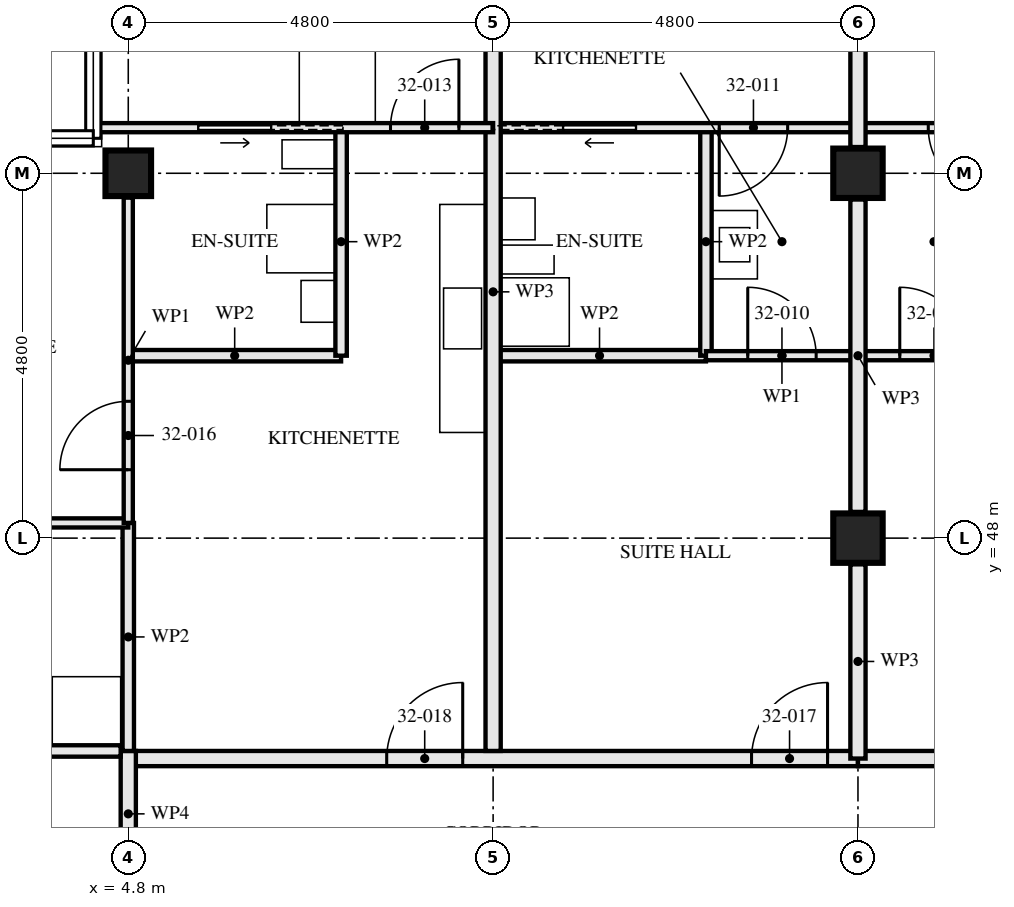
"""IFC4 building model, lengths in metres.
Left out: names, types, materials, properties, quantities, classifications, styles, units other than length and angle.
Written with IfcOpenShell. Run it as: python <this file> out.ifc"""

import sys

from ifc_helpers import new_model, si_unit, direction, frame, frame_2d, origin, origin_2d, place, context, subcontext, project, spatial, rectangle, hollow_rectangle, extrude, element, fill, save


model = new_model("IFC4")
c1 = context("Model", 3, precision=1e-05, world=origin(), true_north=direction((0.0, 1.0)))
c2 = subcontext(c1, "Body", "Model", "MODEL_VIEW")
j1 = project(units=[si_unit("LENGTHUNIT", "METRE"), si_unit("PLANEANGLEUNIT", "RADIAN")], contexts=[c1])
p1 = place(None, origin())
s1 = spatial("IfcSite", under=j1, at=p1, CompositionType="ELEMENT")
p2 = place(p1, origin())
s2 = spatial("IfcBuilding", under=s1, at=p2, CompositionType="ELEMENT")
p3 = place(p2, frame((0.0, 0.0, 119.0)))
s3 = spatial("IfcBuildingStorey", under=s2, at=p3, CompositionType="ELEMENT", Elevation=119.0)
p4 = place(p3, frame((4.8, 52.8, 0.0), z_axis=(0.0, 0.0, 1.0), x_axis=(0.0, 1.0, 0.0)))
e1 = element("IfcColumn", 1, at=p4, inside=s3, PredefinedType="COLUMN", context=c2, shape_type="SweptSolid", body=[
    extrude(hollow_rectangle(XDim=0.6, YDim=0.6, WallThickness=0.08, at=origin_2d()), origin(), (0.0, 0.0, 1.0), 3.5),
])
for number, where, z_axis, x_axis in (
    (2, (14.4, 48.0, 0.0), (0.0, 0.0, 1.0), (1.0, 0.0, 0.0)),
    (3, (14.4, 52.8, 0.0), (0.0, 0.0, 1.0), (1.0, 0.0, 0.0)),
):
    element("IfcColumn", number, at=place(p3, frame(where, z_axis=z_axis, x_axis=x_axis)), inside=s3, PredefinedType="COLUMN", context=c2, shape_type="SweptSolid", body=[
        extrude(hollow_rectangle(XDim=0.65, YDim=0.65, WallThickness=0.05, at=origin_2d()), origin(), (0.0, 0.0, 1.0), 3.5),
    ])
p5 = place(p3, frame((12.4, 53.4, 0.0), z_axis=(0.0, 0.0, 1.0), x_axis=(0.0, -1.0, 0.0)))
e4 = element("IfcWall", 4, at=p5, inside=s3, PredefinedType="PARTITIONING", context=c2, shape_type="SweptSolid", body=[
    extrude(rectangle(XDim=3.0, YDim=0.15, at=frame_2d((1.5, 0.0))), origin(), (0.0, 0.0, 1.0), 2.55),
])
p6 = place(p3, frame((12.4, 50.4, 0.0), z_axis=(0.0, 0.0, 1.0), x_axis=(-1.0, 0.0, 0.0)))
e5 = element("IfcWall", 5, at=p6, inside=s3, PredefinedType="PARTITIONING", context=c2, shape_type="SweptSolid", body=[
    extrude(rectangle(XDim=2.8, YDim=0.15, at=frame_2d((1.4, 0.0))), origin(), (0.0, 0.0, 1.0), 3.33),
])
p7 = place(p3, frame((14.4, 50.4, 0.0), z_axis=(0.0, 0.0, 1.0), x_axis=(-1.0, 0.0, 0.0)))
e6 = element("IfcWall", 6, at=p7, inside=s3, PredefinedType="PARTITIONING", context=c2, shape_type="SweptSolid", body=[
    extrude(rectangle(XDim=2.0, YDim=0.12, at=frame_2d((1.0, 0.0))), origin(), (0.0, 0.0, 1.0), 3.33),
])
p8 = place(p7, frame((0.55, 0.0, 0.0)))
e7 = element("IfcOpeningElement", 7, at=p8, cuts=e6, PredefinedType="OPENING", context=c2, shape_type="SweptSolid", body=[
    extrude(rectangle(XDim=0.9, YDim=2.1, at=frame_2d((0.45, 1.05))), frame((0.0, 0.071, 0.0), z_axis=(0.0, -1.0, 0.0), x_axis=(1.0, 0.0, 0.0)), (0.0, 0.0, 1.0), 0.141),
])
p9 = place(p3, frame((14.4, 53.4, 0.0), z_axis=(0.0, 0.0, 1.0), x_axis=(-1.0, 0.0, 0.0)))
e8 = element("IfcWall", 8, at=p9, inside=s3, PredefinedType="PARTITIONING", context=c2, shape_type="SweptSolid", body=[
    extrude(rectangle(XDim=4.8, YDim=0.12, at=frame_2d((2.4, 0.0))), origin(), (0.0, 0.0, 1.0), 3.33),
])
p10 = place(p9, frame((0.925, 0.0, 0.0)))
e9 = element("IfcOpeningElement", 9, at=p10, cuts=e8, PredefinedType="OPENING", context=c2, shape_type="SweptSolid", body=[
    extrude(rectangle(XDim=0.9, YDim=2.1, at=frame_2d((0.45, 1.05))), frame((0.0, 0.071, 0.0), z_axis=(0.0, -1.0, 0.0), x_axis=(1.0, 0.0, 0.0)), (0.0, 0.0, 1.0), 0.141),
])
p11 = place(p9, frame((2.925, 0.0, 0.0)))
e10 = element("IfcOpeningElement", 10, at=p11, cuts=e8, PredefinedType="OPENING", context=c2, shape_type="SweptSolid", body=[
    extrude(rectangle(XDim=0.95, YDim=2.1, at=frame_2d((0.475, 1.05))), frame((0.0, 0.071, 0.0), z_axis=(0.0, -1.0, 0.0), x_axis=(1.0, 0.0, 0.0)), (0.0, 0.0, 1.0), 0.141),
])
p12 = place(p3, frame((9.6, 57.28, 0.0), z_axis=(0.0, 0.0, 1.0), x_axis=(0.0, -1.0, 0.0)))
e11 = element("IfcWall", 11, at=p12, inside=s3, PredefinedType="PARTITIONING", context=c2, shape_type="SweptSolid", body=[
    extrude(rectangle(XDim=12.08, YDim=0.2, at=frame_2d((6.04, 0.0))), origin(), (0.0, 0.0, 1.0), 2.55),
])
p13 = place(p3, frame((7.6, 53.4, 0.0), z_axis=(0.0, 0.0, 1.0), x_axis=(0.0, -1.0, 0.0)))
e12 = element("IfcWall", 12, at=p13, inside=s3, PredefinedType="PARTITIONING", context=c2, shape_type="SweptSolid", body=[
    extrude(rectangle(XDim=3.0, YDim=0.15, at=frame_2d((1.5, 0.0))), origin(), (0.0, 0.0, 1.0), 2.55),
])
p14 = place(p3, frame((7.6, 50.4, 0.0), z_axis=(0.0, 0.0, 1.0), x_axis=(-1.0, 0.0, 0.0)))
e13 = element("IfcWall", 13, at=p14, inside=s3, PredefinedType="PARTITIONING", context=c2, shape_type="SweptSolid", body=[
    extrude(rectangle(XDim=2.8, YDim=0.15, at=frame_2d((1.4, 0.0))), origin(), (0.0, 0.0, 1.0), 3.33),
])
p15 = place(p3, frame((4.8, 48.2, 0.0), z_axis=(0.0, 0.0, 1.0), x_axis=(0.0, -1.0, 0.0)))
e14 = element("IfcWall", 14, at=p15, inside=s3, PredefinedType="PARTITIONING", context=c2, shape_type="SweptSolid", body=[
    extrude(rectangle(XDim=3.0, YDim=0.15, at=frame_2d((1.5, 0.0))), origin(), (0.0, 0.0, 1.0), 2.55),
])
p16 = place(p3, frame((9.6, 53.4, 0.0), z_axis=(0.0, 0.0, 1.0), x_axis=(-1.0, 0.0, 0.0)))
e15 = element("IfcWall", 15, at=p16, inside=s3, PredefinedType="PARTITIONING", context=c2, shape_type="SweptSolid", body=[
    extrude(rectangle(XDim=5.24, YDim=0.12, at=frame_2d((2.62, 0.0))), origin(), (0.0, 0.0, 1.0), 2.32),
])
p17 = place(p16, frame((0.45, 0.0, 0.0)))
e16 = element("IfcOpeningElement", 16, at=p17, cuts=e15, PredefinedType="OPENING", context=c2, shape_type="SweptSolid", body=[
    extrude(rectangle(XDim=0.9, YDim=2.1, at=frame_2d((0.45, 1.05))), frame((0.0, 0.071, 0.0), z_axis=(0.0, -1.0, 0.0), x_axis=(1.0, 0.0, 0.0)), (0.0, 0.0, 1.0), 0.141),
])
p18 = place(p16, frame((2.925, 0.0, 0.0)))
e17 = element("IfcOpeningElement", 17, at=p18, cuts=e15, PredefinedType="OPENING", context=c2, shape_type="SweptSolid", body=[
    extrude(rectangle(XDim=0.95, YDim=2.1, at=frame_2d((0.475, 1.05))), frame((0.0, 0.071, 0.0), z_axis=(0.0, -1.0, 0.0), x_axis=(1.0, 0.0, 0.0)), (0.0, 0.0, 1.0), 0.141),
])
p19 = place(p3, frame((4.8, 48.2, 0.0), z_axis=(0.0, 0.0, 1.0), x_axis=(-1.0, 0.0, 0.0)))
e18 = element("IfcWall", 18, at=p19, inside=s3, PredefinedType="PARTITIONING", context=c2, shape_type="SweptSolid", body=[
    extrude(rectangle(XDim=4.48, YDim=0.12, at=frame_2d((2.24, 0.0))), origin(), (0.0, 0.0, 1.0), 3.33),
])
p20 = place(p19, frame((1.925, 0.0, 0.0)))
e19 = element("IfcOpeningElement", 19, at=p20, cuts=e18, PredefinedType="OPENING", context=c2, shape_type="SweptSolid", body=[
    extrude(rectangle(XDim=0.95, YDim=2.1, at=frame_2d((0.475, 1.05))), frame((0.0, 0.071, 0.0), z_axis=(0.0, -1.0, 0.0), x_axis=(1.0, 0.0, 0.0)), (0.0, 0.0, 1.0), 0.141),
])
p21 = place(p3, frame((4.8, 52.48, 0.0), z_axis=(0.0, 0.0, 1.0), x_axis=(0.0, -1.0, 0.0)))
e20 = element("IfcWall", 20, at=p21, inside=s3, PredefinedType="PARTITIONING", context=c2, shape_type="SweptSolid", body=[
    extrude(rectangle(XDim=4.28, YDim=0.12, at=frame_2d((2.14, 0.0))), origin(), (0.0, 0.0, 1.0), 3.33),
])
p22 = place(p21, frame((2.68, 0.0, 0.0)))
e21 = element("IfcOpeningElement", 21, at=p22, cuts=e20, PredefinedType="OPENING", context=c2, shape_type="SweptSolid", body=[
    extrude(rectangle(XDim=0.9, YDim=2.1, at=frame_2d((0.45, 1.05))), frame((0.0, 0.071, 0.0), z_axis=(0.0, -1.0, 0.0), x_axis=(1.0, 0.0, 0.0)), (0.0, 0.0, 1.0), 0.141),
])
p23 = place(p3, frame((14.4, 45.1, 0.0), z_axis=(0.0, 0.0, 1.0), x_axis=(-1.0, 0.0, 0.0)))
e22 = element("IfcWall", 22, at=p23, inside=s3, PredefinedType="PARTITIONING", context=c2, shape_type="SweptSolid", body=[
    extrude(rectangle(XDim=9.6, YDim=0.2, at=frame_2d((4.8, 0.0))), origin(), (0.0, 0.0, 1.0), 3.33),
])
p24 = place(p23, frame((0.4, 0.0, 0.0)))
e23 = element("IfcOpeningElement", 23, at=p24, cuts=e22, PredefinedType="OPENING", context=c2, shape_type="SweptSolid", body=[
    extrude(rectangle(XDim=1.0, YDim=2.1, at=frame_2d((0.5, 1.05))), frame((0.0, 0.111, 0.0), z_axis=(0.0, -1.0, 0.0), x_axis=(1.0, 0.0, 0.0)), (0.0, 0.0, 1.0), 0.221),
])
p25 = place(p23, frame((5.2, 0.0, 0.0)))
e24 = element("IfcOpeningElement", 24, at=p25, cuts=e22, PredefinedType="OPENING", context=c2, shape_type="SweptSolid", body=[
    extrude(rectangle(XDim=1.0, YDim=2.1, at=frame_2d((0.5, 1.05))), frame((0.0, 0.111, 0.0), z_axis=(0.0, -1.0, 0.0), x_axis=(1.0, 0.0, 0.0)), (0.0, 0.0, 1.0), 0.221),
])
p26 = place(p3, frame((4.8, 45.2, 0.0), z_axis=(0.0, 0.0, 1.0), x_axis=(0.0, -1.0, 0.0)))
e25 = element("IfcWall", 25, at=p26, inside=s3, PredefinedType="PARTITIONING", context=c2, shape_type="SweptSolid", body=[
    extrude(rectangle(XDim=1.655, YDim=0.2, at=frame_2d((0.828, 0.0))), origin(), (0.0, 0.0, 1.0), 3.33),
])
p27 = place(p3, frame((16.4, 50.4, 0.0), z_axis=(0.0, 0.0, 1.0), x_axis=(-1.0, 0.0, 0.0)))
e26 = element("IfcWall", 26, at=p27, inside=s3, PredefinedType="PARTITIONING", context=c2, shape_type="SweptSolid", body=[
    extrude(rectangle(XDim=2.0, YDim=0.12, at=frame_2d((1.0, 0.0))), origin(), (0.0, 0.0, 1.0), 3.33),
])
p28 = place(p27, frame((0.55, 0.0, 0.0)))
e27 = element("IfcOpeningElement", 27, at=p28, cuts=e26, PredefinedType="OPENING", context=c2, shape_type="SweptSolid", body=[
    extrude(rectangle(XDim=0.9, YDim=2.1, at=frame_2d((0.45, 1.05))), frame((0.0, 0.071, 0.0), z_axis=(0.0, -1.0, 0.0), x_axis=(1.0, 0.0, 0.0)), (0.0, 0.0, 1.0), 0.141),
])
p29 = place(p3, frame((19.2, 53.4, 0.0), z_axis=(0.0, 0.0, 1.0), x_axis=(-1.0, 0.0, 0.0)))
e28 = element("IfcWall", 28, at=p29, inside=s3, PredefinedType="PARTITIONING", context=c2, shape_type="SweptSolid", body=[
    extrude(rectangle(XDim=4.8, YDim=0.12, at=frame_2d((2.4, 0.0))), origin(), (0.0, 0.0, 1.0), 3.33),
])
p30 = place(p29, frame((2.975, 0.0, 0.0)))
e29 = element("IfcOpeningElement", 29, at=p30, cuts=e28, PredefinedType="OPENING", context=c2, shape_type="SweptSolid", body=[
    extrude(rectangle(XDim=0.9, YDim=2.1, at=frame_2d((0.45, 1.05))), frame((0.0, 0.071, 0.0), z_axis=(0.0, -1.0, 0.0), x_axis=(1.0, 0.0, 0.0)), (0.0, 0.0, 1.0), 0.141),
])
p31 = place(p29, frame((0.925, 0.0, 0.0)))
e30 = element("IfcOpeningElement", 30, at=p31, cuts=e28, PredefinedType="OPENING", context=c2, shape_type="SweptSolid", body=[
    extrude(rectangle(XDim=0.95, YDim=2.1, at=frame_2d((0.475, 1.05))), frame((0.0, 0.071, 0.0), z_axis=(0.0, -1.0, 0.0), x_axis=(1.0, 0.0, 0.0)), (0.0, 0.0, 1.0), 0.141),
])
p32 = place(p3, frame((29.24, 45.1, 0.0), z_axis=(0.0, 0.0, 1.0), x_axis=(-1.0, 0.0, 0.0)))
e31 = element("IfcWall", 31, at=p32, inside=s3, PredefinedType="PARTITIONING", context=c2, shape_type="SweptSolid", body=[
    extrude(rectangle(XDim=14.84, YDim=0.2, at=frame_2d((7.42, 0.0))), origin(), (0.0, 0.0, 1.0), 2.32),
])
p33 = place(p32, frame((0.84, 0.0, 0.0)))
e32 = element("IfcOpeningElement", 32, at=p33, cuts=e31, PredefinedType="OPENING", context=c2, shape_type="SweptSolid", body=[
    extrude(rectangle(XDim=1.0, YDim=2.1, at=frame_2d((0.5, 1.05))), frame((0.0, 0.111, 0.0), z_axis=(0.0, -1.0, 0.0), x_axis=(1.0, 0.0, 0.0)), (0.0, 0.0, 1.0), 0.221),
])
p34 = place(p32, frame((5.64, 0.0, 0.0)))
e33 = element("IfcOpeningElement", 33, at=p34, cuts=e31, PredefinedType="OPENING", context=c2, shape_type="SweptSolid", body=[
    extrude(rectangle(XDim=1.0, YDim=2.1, at=frame_2d((0.5, 1.05))), frame((0.0, 0.111, 0.0), z_axis=(0.0, -1.0, 0.0), x_axis=(1.0, 0.0, 0.0)), (0.0, 0.0, 1.0), 0.221),
])
p35 = place(p32, frame((10.44, 0.0, 0.0)))
e34 = element("IfcOpeningElement", 34, at=p35, cuts=e31, PredefinedType="OPENING", context=c2, shape_type="SweptSolid", body=[
    extrude(rectangle(XDim=1.0, YDim=2.1, at=frame_2d((0.5, 1.05))), frame((0.0, 0.111, 0.0), z_axis=(0.0, -1.0, 0.0), x_axis=(1.0, 0.0, 0.0)), (0.0, 0.0, 1.0), 0.221),
])
p36 = place(p3, frame((14.4, 45.1, 0.0), z_axis=(0.0, 0.0, 1.0), x_axis=(0.0, 1.0, 0.0)))
e35 = element("IfcWall", 35, at=p36, inside=s3, PredefinedType="PARTITIONING", context=c2, shape_type="SweptSolid", body=[
    extrude(rectangle(XDim=2.555, YDim=0.2, at=frame_2d((1.277, 0.0))), origin(), (0.0, 0.0, 1.0), 2.32),
])
p37 = place(p3, frame((14.4, 48.345, 0.0), z_axis=(0.0, 0.0, 1.0), x_axis=(0.0, 1.0, 0.0)))
e36 = element("IfcWall", 36, at=p37, inside=s3, PredefinedType="PARTITIONING", context=c2, shape_type="SweptSolid", body=[
    extrude(rectangle(XDim=4.11, YDim=0.2, at=frame_2d((2.055, 0.0))), origin(), (0.0, 0.0, 1.0), 2.32),
])
p38 = place(p3, frame((14.4, 53.145, 0.0), z_axis=(0.0, 0.0, 1.0), x_axis=(0.0, 1.0, 0.0)))
e37 = element("IfcWall", 37, at=p38, inside=s3, PredefinedType="PARTITIONING", context=c2, shape_type="SweptSolid", body=[
    extrude(rectangle(XDim=4.135, YDim=0.2, at=frame_2d((2.067, 0.0))), origin(), (0.0, 0.0, 1.0), 2.32),
])
p39 = place(p3, frame((4.7, 45.2, 0.0), z_axis=(0.0, 0.0, 1.0), x_axis=(-1.0, 0.0, 0.0)))
e38 = element("IfcWall", 38, at=p39, inside=s3, PredefinedType="PARTITIONING", context=c2, shape_type="SweptSolid", body=[
    extrude(rectangle(XDim=5.14, YDim=0.15, at=frame_2d((2.57, 0.0))), origin(), (0.0, 0.0, 1.0), 2.32),
])
p40 = place(p8, frame((0.9, 0.0, 0.0), z_axis=(0.0, 0.0, 1.0), x_axis=(-1.0, 0.0, 0.0)))
e39 = element("IfcDoor", 39, at=p40, inside=s3, OperationType="SINGLE_SWING_RIGHT", PredefinedType="DOOR", context=c2, shape_type="SweptSolid", body=[
    extrude(rectangle(XDim=0.9, YDim=2.1, at=frame_2d((0.45, 1.05))), frame((0.0, 0.022, 0.0), z_axis=(0.0, -1.0, 0.0), x_axis=(1.0, 0.0, 0.0)), (0.0, 0.0, 1.0), 0.044),
])
fill(e7, e39)
p41 = place(p10, origin())
e40 = element("IfcDoor", 40, at=p41, inside=s3, OperationType="SINGLE_SWING_LEFT", PredefinedType="DOOR", context=c2, shape_type="SweptSolid", body=[
    extrude(rectangle(XDim=0.9, YDim=2.1, at=frame_2d((0.45, 1.05))), frame((0.0, 0.022, 0.0), z_axis=(0.0, -1.0, 0.0), x_axis=(1.0, 0.0, 0.0)), (0.0, 0.0, 1.0), 0.044),
])
fill(e9, e40)
p42 = place(p11, origin())
e41 = element("IfcDoor", 41, at=p42, inside=s3, OperationType="SLIDING_TO_LEFT", PredefinedType="DOOR", context=c2, shape_type="SweptSolid", body=[
    extrude(rectangle(XDim=0.95, YDim=2.1, at=frame_2d((0.475, 1.05))), frame((0.0, 0.022, 0.0), z_axis=(0.0, -1.0, 0.0), x_axis=(1.0, 0.0, 0.0)), (0.0, 0.0, 1.0), 0.044),
])
fill(e10, e41)
p43 = place(p17, frame((0.9, 0.0, 0.0), z_axis=(0.0, 0.0, 1.0), x_axis=(-1.0, 0.0, 0.0)))
e42 = element("IfcDoor", 42, at=p43, inside=s3, OperationType="SINGLE_SWING_LEFT", PredefinedType="DOOR", context=c2, shape_type="SweptSolid", body=[
    extrude(rectangle(XDim=0.9, YDim=2.1, at=frame_2d((0.45, 1.05))), frame((0.0, 0.022, 0.0), z_axis=(0.0, -1.0, 0.0), x_axis=(1.0, 0.0, 0.0)), (0.0, 0.0, 1.0), 0.044),
])
fill(e16, e42)
p44 = place(p18, origin())
e43 = element("IfcDoor", 43, at=p44, inside=s3, OperationType="SLIDING_TO_RIGHT", PredefinedType="DOOR", context=c2, shape_type="SweptSolid", body=[
    extrude(rectangle(XDim=0.95, YDim=2.1, at=frame_2d((0.475, 1.05))), frame((0.0, 0.022, 0.0), z_axis=(0.0, -1.0, 0.0), x_axis=(1.0, 0.0, 0.0)), (0.0, 0.0, 1.0), 0.044),
])
fill(e17, e43)
p45 = place(p22, frame((0.9, 0.0, 0.0), z_axis=(0.0, 0.0, 1.0), x_axis=(-1.0, 0.0, 0.0)))
e44 = element("IfcDoor", 44, at=p45, inside=s3, OperationType="SINGLE_SWING_RIGHT", PredefinedType="DOOR", context=c2, shape_type="SweptSolid", body=[
    extrude(rectangle(XDim=0.9, YDim=2.1, at=frame_2d((0.45, 1.05))), frame((0.0, 0.022, 0.0), z_axis=(0.0, -1.0, 0.0), x_axis=(1.0, 0.0, 0.0)), (0.0, 0.0, 1.0), 0.044),
])
fill(e21, e44)
p46 = place(p24, frame((1.0, 0.0, 0.0), z_axis=(0.0, 0.0, 1.0), x_axis=(-1.0, 0.0, 0.0)))
e45 = element("IfcDoor", 45, at=p46, inside=s3, OperationType="SINGLE_SWING_LEFT", PredefinedType="DOOR", context=c2, shape_type="SweptSolid", body=[
    extrude(rectangle(XDim=1.0, YDim=2.1, at=frame_2d((0.5, 1.05))), frame((0.0, 0.027, 0.0), z_axis=(0.0, -1.0, 0.0), x_axis=(1.0, 0.0, 0.0)), (0.0, 0.0, 1.0), 0.054),
])
fill(e23, e45)
p47 = place(p25, frame((1.0, 0.0, 0.0), z_axis=(0.0, 0.0, 1.0), x_axis=(-1.0, 0.0, 0.0)))
e46 = element("IfcDoor", 46, at=p47, inside=s3, OperationType="SINGLE_SWING_LEFT", PredefinedType="DOOR", context=c2, shape_type="SweptSolid", body=[
    extrude(rectangle(XDim=1.0, YDim=2.1, at=frame_2d((0.5, 1.05))), frame((0.0, 0.027, 0.0), z_axis=(0.0, -1.0, 0.0), x_axis=(1.0, 0.0, 0.0)), (0.0, 0.0, 1.0), 0.054),
])
fill(e24, e46)
p48 = place(p28, frame((0.9, 0.0, 0.0), z_axis=(0.0, 0.0, 1.0), x_axis=(-1.0, 0.0, 0.0)))
e47 = element("IfcDoor", 47, at=p48, inside=s3, OperationType="SINGLE_SWING_RIGHT", PredefinedType="DOOR", context=c2, shape_type="SweptSolid", body=[
    extrude(rectangle(XDim=0.9, YDim=2.1, at=frame_2d((0.45, 1.05))), frame((0.0, 0.022, 0.0), z_axis=(0.0, -1.0, 0.0), x_axis=(1.0, 0.0, 0.0)), (0.0, 0.0, 1.0), 0.044),
])
fill(e27, e47)
p49 = place(p30, origin())
e48 = element("IfcDoor", 48, at=p49, inside=s3, OperationType="SINGLE_SWING_RIGHT", PredefinedType="DOOR", context=c2, shape_type="SweptSolid", body=[
    extrude(rectangle(XDim=0.9, YDim=2.1, at=frame_2d((0.45, 1.05))), frame((0.0, 0.022, 0.0), z_axis=(0.0, -1.0, 0.0), x_axis=(1.0, 0.0, 0.0)), (0.0, 0.0, 1.0), 0.044),
])
fill(e29, e48)
save(model, sys.argv[1])
